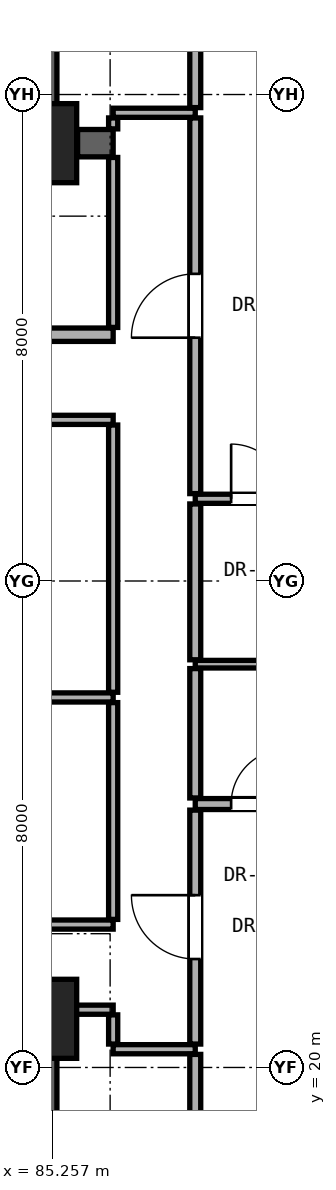
"""IFC4 building model, lengths in metres.
Left out: names, types, materials, properties, quantities, classifications, styles, units other than length and angle.
Written with IfcOpenShell. Run it as: python <this file> out.ifc"""

import sys

from ifc_helpers import new_model, si_unit, direction, frame, frame_2d, origin, origin_2d, place, context, subcontext, project, spatial, rectangle, extrude, element, fill, save


model = new_model("IFC4")
c1 = context("Model", 3, precision=1e-05, world=origin(), true_north=direction((0.0, 1.0)))
c2 = subcontext(c1, "Body", "Model", "MODEL_VIEW")
j1 = project(units=[si_unit("LENGTHUNIT", "METRE"), si_unit("PLANEANGLEUNIT", "RADIAN")], contexts=[c1])
p1 = place(None, origin())
s1 = spatial("IfcSite", under=j1, at=p1, CompositionType="ELEMENT")
p2 = place(p1, origin())
s2 = spatial("IfcBuilding", under=s1, at=p2, CompositionType="ELEMENT")
p3 = place(p2, frame((0.0, 0.0, 65.3)))
s3 = spatial("IfcBuildingStorey", under=s2, at=p3, CompositionType="ELEMENT", Elevation=65.3)
for number, where, z_axis, x_axis in (
    (1, (85.0, 20.8, 0.0), (0.0, 0.0, 1.0), (1.0, 0.0, 0.0)),
    (2, (85.0, 35.2, 0.0), (0.0, 0.0, 1.0), (1.0, 0.0, 0.0)),
):
    element("IfcColumn", number, at=place(p3, frame(where, z_axis=z_axis, x_axis=x_axis)), inside=s3, PredefinedType="COLUMN", context=c2, shape_type="SweptSolid", body=[
        extrude(rectangle(XDim=1.3, YDim=1.3, at=origin_2d()), origin(), (0.0, 0.0, 1.0), 3.3),
    ])
for number, where, z_axis, x_axis in (
    (3, (85.0, 35.2, 0.0), (0.0, 0.0, 1.0), (0.0, 1.0, 0.0)),
    (4, (85.0, 15.2, 0.0), (0.0, 0.0, 1.0), (0.0, 1.0, 0.0)),
):
    element("IfcWall", number, at=place(p3, frame(where, z_axis=z_axis, x_axis=x_axis)), inside=s3, PredefinedType="SHEAR", context=c2, shape_type="SweptSolid", body=[
        extrude(rectangle(XDim=5.6, YDim=0.65, at=frame_2d((2.8, 0.0))), origin(), (0.0, 0.0, 1.0), 3.06),
    ])
p4 = place(p3, frame((86.25, 20.3, 0.0), z_axis=(0.0, 0.0, 1.0), x_axis=(1.0, 0.0, 0.0)))
e5 = element("IfcWall", 5, at=p4, inside=s3, PredefinedType="PARTITIONING", context=c2, shape_type="SweptSolid", body=[
    extrude(rectangle(XDim=1.35, YDim=0.15, at=frame_2d((0.675, 0.0))), origin(), (0.0, 0.0, 1.0), 3.06),
])
p5 = place(p3, frame((85.32, 20.95, 0.0), z_axis=(0.0, 0.0, 1.0), x_axis=(1.0, 0.0, 0.0)))
e6 = element("IfcWall", 6, at=p5, inside=s3, PredefinedType="PARTITIONING", context=c2, shape_type="SweptSolid", body=[
    extrude(rectangle(XDim=0.93, YDim=0.15, at=frame_2d((0.465, 0.0))), origin(), (0.0, 0.0, 1.0), 2.452),
])
p6 = place(p3, frame((66.62, 22.35, 0.0), z_axis=(0.0, 0.0, 1.0), x_axis=(1.0, 0.0, 0.0)))
e7 = element("IfcWall", 7, at=p6, inside=s3, PredefinedType="PARTITIONING", context=c2, shape_type="SweptSolid", body=[
    extrude(rectangle(XDim=19.63, YDim=0.15, at=frame_2d((9.815, 0.0))), origin(), (0.0, 0.0, 1.0), 2.125),
])
p7 = place(p6, frame((8.981, 0.0, 0.0)))
e8 = element("IfcOpeningElement", 8, at=p7, cuts=e7, PredefinedType="OPENING", context=c2, shape_type="SweptSolid", body=[
    extrude(rectangle(XDim=0.85, YDim=2.01, at=frame_2d((0.425, 1.005))), frame((0.0, 0.085, 0.0), z_axis=(0.0, -1.0, 0.0), x_axis=(1.0, 0.0, 0.0)), (0.0, 0.0, 1.0), 0.17),
])
p8 = place(p6, frame((16.061, 0.0, 0.0)))
e9 = element("IfcOpeningElement", 9, at=p8, cuts=e7, PredefinedType="OPENING", context=c2, shape_type="SweptSolid", body=[
    extrude(rectangle(XDim=0.85, YDim=2.01, at=frame_2d((0.425, 1.005))), frame((0.0, 0.085, 0.0), z_axis=(0.0, -1.0, 0.0), x_axis=(1.0, 0.0, 0.0)), (0.0, 0.0, 1.0), 0.17),
])
p9 = place(p3, frame((87.6, 24.332, 0.0), z_axis=(0.0, 0.0, 1.0), x_axis=(1.0, 0.0, 0.0)))
e10 = element("IfcWall", 10, at=p9, inside=s3, PredefinedType="PARTITIONING", context=c2, shape_type="SweptSolid", body=[
    extrude(rectangle(XDim=7.292, YDim=0.18, at=frame_2d((3.646, 0.0))), origin(), (0.0, 0.0, 1.0), 2.196),
])
p10 = place(p9, frame((4.171, 0.0, 0.0)))
e11 = element("IfcOpeningElement", 11, at=p10, cuts=e10, PredefinedType="OPENING", context=c2, shape_type="SweptSolid", body=[
    extrude(rectangle(XDim=0.95, YDim=2.15, at=frame_2d((0.475, 1.075))), frame((0.0, 0.1, 0.0), z_axis=(0.0, -1.0, 0.0), x_axis=(1.0, 0.0, 0.0)), (0.0, 0.0, 1.0), 0.2),
])
p11 = place(p9, frame((0.59, 0.0, 0.0)))
e12 = element("IfcOpeningElement", 12, at=p11, cuts=e10, PredefinedType="OPENING", context=c2, shape_type="SweptSolid", body=[
    extrude(rectangle(XDim=0.9, YDim=2.1, at=frame_2d((0.45, 1.05))), frame((0.0, 0.1, 0.0), z_axis=(0.0, -1.0, 0.0), x_axis=(1.0, 0.0, 0.0)), (0.0, 0.0, 1.0), 0.2),
])
p12 = place(p3, frame((72.05, 26.085, 0.0), z_axis=(0.0, 0.0, 1.0), x_axis=(1.0, 0.0, 0.0)))
e13 = element("IfcWall", 13, at=p12, inside=s3, PredefinedType="PARTITIONING", context=c2, shape_type="SweptSolid", body=[
    extrude(rectangle(XDim=14.2, YDim=0.15, at=frame_2d((7.1, 0.0))), origin(), (0.0, 0.0, 1.0), 2.125),
])
p13 = place(p3, frame((87.6, 26.632, 0.0), z_axis=(0.0, 0.0, 1.0), x_axis=(1.0, 0.0, 0.0)))
e14 = element("IfcWall", 14, at=p13, inside=s3, PredefinedType="PARTITIONING", context=c2, shape_type="SweptSolid", body=[
    extrude(rectangle(XDim=7.292, YDim=0.125, at=frame_2d((3.646, 0.0))), origin(), (0.0, 0.0, 1.0), 2.196),
])
p14 = place(p3, frame((87.6, 29.352, 0.0), z_axis=(0.0, 0.0, 1.0), x_axis=(1.0, 0.0, 0.0)))
e15 = element("IfcWall", 15, at=p14, inside=s3, PredefinedType="PARTITIONING", context=c2, shape_type="SweptSolid", body=[
    extrude(rectangle(XDim=7.292, YDim=0.15, at=frame_2d((3.646, 0.0))), origin(), (0.0, 0.0, 1.0), 2.196),
])
p15 = place(p14, frame((4.171, 0.0, 0.0)))
e16 = element("IfcOpeningElement", 16, at=p15, cuts=e15, PredefinedType="OPENING", context=c2, shape_type="SweptSolid", body=[
    extrude(rectangle(XDim=0.95, YDim=2.15, at=frame_2d((0.475, 1.075))), frame((0.0, 0.085, 0.0), z_axis=(0.0, -1.0, 0.0), x_axis=(1.0, 0.0, 0.0)), (0.0, 0.0, 1.0), 0.17),
])
p16 = place(p14, frame((0.59, 0.0, 0.0)))
e17 = element("IfcOpeningElement", 17, at=p16, cuts=e15, PredefinedType="OPENING", context=c2, shape_type="SweptSolid", body=[
    extrude(rectangle(XDim=0.9, YDim=2.1, at=frame_2d((0.45, 1.05))), frame((0.0, 0.085, 0.0), z_axis=(0.0, -1.0, 0.0), x_axis=(1.0, 0.0, 0.0)), (0.0, 0.0, 1.0), 0.17),
])
p17 = place(p3, frame((66.62, 30.65, 0.0), z_axis=(0.0, 0.0, 1.0), x_axis=(1.0, 0.0, 0.0)))
e18 = element("IfcWall", 18, at=p17, inside=s3, PredefinedType="PARTITIONING", context=c2, shape_type="SweptSolid", body=[
    extrude(rectangle(XDim=19.63, YDim=0.15, at=frame_2d((9.815, 0.0))), origin(), (0.0, 0.0, 1.0), 2.125),
])
p18 = place(p17, frame((3.855, 0.0, 0.0)))
e19 = element("IfcOpeningElement", 19, at=p18, cuts=e18, PredefinedType="OPENING", context=c2, shape_type="SweptSolid", body=[
    extrude(rectangle(XDim=0.85, YDim=2.01, at=frame_2d((0.425, 1.005))), frame((0.0, 0.085, 0.0), z_axis=(0.0, -1.0, 0.0), x_axis=(1.0, 0.0, 0.0)), (0.0, 0.0, 1.0), 0.17),
])
p19 = place(p17, frame((8.981, 0.0, 0.0)))
e20 = element("IfcOpeningElement", 20, at=p19, cuts=e18, PredefinedType="OPENING", context=c2, shape_type="SweptSolid", body=[
    extrude(rectangle(XDim=0.85, YDim=2.01, at=frame_2d((0.425, 1.005))), frame((0.0, 0.085, 0.0), z_axis=(0.0, -1.0, 0.0), x_axis=(1.0, 0.0, 0.0)), (0.0, 0.0, 1.0), 0.17),
])
p20 = place(p17, frame((16.061, 0.0, 0.0)))
e21 = element("IfcOpeningElement", 21, at=p20, cuts=e18, PredefinedType="OPENING", context=c2, shape_type="SweptSolid", body=[
    extrude(rectangle(XDim=0.85, YDim=2.01, at=frame_2d((0.425, 1.005))), frame((0.0, 0.085, 0.0), z_axis=(0.0, -1.0, 0.0), x_axis=(1.0, 0.0, 0.0)), (0.0, 0.0, 1.0), 0.17),
])
p21 = place(p3, frame((71.55, 32.05, 0.0), z_axis=(0.0, 0.0, 1.0), x_axis=(1.0, 0.0, 0.0)))
e22 = element("IfcWall", 22, at=p21, inside=s3, PredefinedType="SOLIDWALL", context=c2, shape_type="SweptSolid", body=[
    extrude(rectangle(XDim=14.7, YDim=0.22, at=frame_2d((7.35, 0.0))), origin(), (0.0, 0.0, 1.0), 2.125),
])
p22 = place(p21, frame((11.39, 0.0, 0.0)))
e23 = element("IfcOpeningElement", 23, at=p22, cuts=e22, PredefinedType="OPENING", context=c2, shape_type="SweptSolid", body=[
    extrude(rectangle(XDim=0.85, YDim=2.01, at=frame_2d((0.425, 1.005))), frame((0.0, 0.12, 0.0), z_axis=(0.0, -1.0, 0.0), x_axis=(1.0, 0.0, 0.0)), (0.0, 0.0, 1.0), 0.24),
])
p23 = place(p21, frame((6.065, 0.0, 0.0)))
e24 = element("IfcOpeningElement", 24, at=p23, cuts=e22, PredefinedType="OPENING", context=c2, shape_type="SweptSolid", body=[
    extrude(rectangle(XDim=0.85, YDim=2.01, at=frame_2d((0.425, 1.005))), frame((0.0, 0.12, 0.0), z_axis=(0.0, -1.0, 0.0), x_axis=(1.0, 0.0, 0.0)), (0.0, 0.0, 1.0), 0.24),
])
p24 = place(p21, frame((0.7, 0.0, 0.0)))
e25 = element("IfcOpeningElement", 25, at=p24, cuts=e22, PredefinedType="OPENING", context=c2, shape_type="SweptSolid", body=[
    extrude(rectangle(XDim=0.85, YDim=2.01, at=frame_2d((0.425, 1.005))), frame((0.0, 0.12, 0.0), z_axis=(0.0, -1.0, 0.0), x_axis=(1.0, 0.0, 0.0)), (0.0, 0.0, 1.0), 0.24),
])
p25 = place(p21, frame((2.55, 0.0, 0.0)))
e26 = element("IfcOpeningElement", 26, at=p25, cuts=e22, PredefinedType="OPENING", context=c2, shape_type="SweptSolid", body=[
    extrude(rectangle(XDim=0.85, YDim=2.01, at=frame_2d((0.425, 1.005))), frame((0.0, 0.12, 0.0), z_axis=(0.0, -1.0, 0.0), x_axis=(1.0, 0.0, 0.0)), (0.0, 0.0, 1.0), 0.24),
])
p26 = place(p3, frame((85.665, 35.2, 0.0), z_axis=(0.0, 0.0, 1.0), x_axis=(1.0, 0.0, 0.0)))
e27 = element("IfcWall", 27, at=p26, inside=s3, PredefinedType="SHEAR", context=c2, shape_type="SweptSolid", body=[
    extrude(rectangle(XDim=0.585, YDim=0.45, at=frame_2d((0.292, 0.0))), origin(), (0.0, 0.0, 1.0), 3.06),
])
p27 = place(p3, frame((86.25, 35.7, 0.0), z_axis=(0.0, 0.0, 1.0), x_axis=(1.0, 0.0, 0.0)))
e28 = element("IfcWall", 28, at=p27, inside=s3, PredefinedType="PARTITIONING", context=c2, shape_type="SweptSolid", body=[
    extrude(rectangle(XDim=1.35, YDim=0.15, at=frame_2d((0.675, 0.0))), origin(), (0.0, 0.0, 1.0), 3.06),
])
p28 = place(p3, frame((86.25, 20.385, 0.0), z_axis=(0.0, 0.0, 1.0), x_axis=(0.0, 1.0, 0.0)))
e29 = element("IfcWall", 29, at=p28, inside=s3, PredefinedType="PARTITIONING", context=c2, shape_type="SweptSolid", body=[
    extrude(rectangle(XDim=0.48, YDim=0.15, at=frame_2d((0.24, 0.0))), origin(), (0.0, 0.0, 1.0), 2.452),
])
p29 = place(p3, frame((86.25, 22.435, 0.0), z_axis=(0.0, 0.0, 1.0), x_axis=(0.0, 1.0, 0.0)))
e30 = element("IfcWall", 30, at=p29, inside=s3, PredefinedType="PARTITIONING", context=c2, shape_type="SweptSolid", body=[
    extrude(rectangle(XDim=3.565, YDim=0.15, at=frame_2d((1.782, 0.0))), origin(), (0.0, 0.0, 1.0), 3.06),
])
p30 = place(p3, frame((86.25, 26.17, 0.0), z_axis=(0.0, 0.0, 1.0), x_axis=(0.0, 1.0, 0.0)))
e31 = element("IfcWall", 31, at=p30, inside=s3, PredefinedType="PARTITIONING", context=c2, shape_type="SweptSolid", body=[
    extrude(rectangle(XDim=4.395, YDim=0.15, at=frame_2d((2.198, 0.0))), origin(), (0.0, 0.0, 1.0), 2.279),
])
p31 = place(p3, frame((86.25, 32.17, 0.0), z_axis=(0.0, 0.0, 1.0), x_axis=(0.0, 1.0, 0.0)))
e32 = element("IfcWall", 32, at=p31, inside=s3, PredefinedType="PARTITIONING", context=c2, shape_type="SweptSolid", body=[
    extrude(rectangle(XDim=2.795, YDim=0.15, at=frame_2d((1.397, 0.0))), origin(), (0.0, 0.0, 1.0), 2.452),
])
p32 = place(p3, frame((86.25, 35.435, 0.0), z_axis=(0.0, 0.0, 1.0), x_axis=(0.0, 1.0, 0.0)))
e33 = element("IfcWall", 33, at=p32, inside=s3, PredefinedType="PARTITIONING", context=c2, shape_type="SweptSolid", body=[
    extrude(rectangle(XDim=0.18, YDim=0.15, at=frame_2d((0.09, 0.0))), origin(), (0.0, 0.0, 1.0), 2.452),
])
p33 = place(p3, frame((87.6, 16.537, 0.0), z_axis=(0.0, 0.0, 1.0), x_axis=(0.0, 1.0, 0.0)))
e34 = element("IfcWall", 34, at=p33, inside=s3, PredefinedType="PARTITIONING", context=c2, shape_type="SweptSolid", body=[
    extrude(rectangle(XDim=3.678, YDim=0.18, at=frame_2d((1.839, 0.0))), origin(), (0.0, 0.0, 1.0), 2.436),
])
p34 = place(p3, frame((87.6, 20.385, 0.0), z_axis=(0.0, 0.0, 1.0), x_axis=(0.0, 1.0, 0.0)))
e35 = element("IfcWall", 35, at=p34, inside=s3, PredefinedType="PARTITIONING", context=c2, shape_type="SweptSolid", body=[
    extrude(rectangle(XDim=3.847, YDim=0.18, at=frame_2d((1.923, 0.0))), origin(), (0.0, 0.0, 1.0), 2.452),
])
p35 = place(p34, frame((1.398, 0.0, 0.0)))
e36 = element("IfcOpeningElement", 36, at=p35, cuts=e35, PredefinedType="OPENING", context=c2, shape_type="SweptSolid", body=[
    extrude(rectangle(XDim=1.05, YDim=2.2, at=frame_2d((0.525, 1.1))), frame((0.0, 0.1, 0.0), z_axis=(0.0, -1.0, 0.0), x_axis=(1.0, 0.0, 0.0)), (0.0, 0.0, 1.0), 0.2),
])
p36 = place(p3, frame((87.6, 24.432, 0.0), z_axis=(0.0, 0.0, 1.0), x_axis=(0.0, 1.0, 0.0)))
e37 = element("IfcWall", 37, at=p36, inside=s3, PredefinedType="PARTITIONING", context=c2, shape_type="SweptSolid", body=[
    extrude(rectangle(XDim=2.128, YDim=0.18, at=frame_2d((1.064, 0.0))), origin(), (0.0, 0.0, 1.0), 3.06),
])
p37 = place(p3, frame((87.6, 26.705, 0.0), z_axis=(0.0, 0.0, 1.0), x_axis=(0.0, 1.0, 0.0)))
e38 = element("IfcWall", 38, at=p37, inside=s3, PredefinedType="PARTITIONING", context=c2, shape_type="SweptSolid", body=[
    extrude(rectangle(XDim=2.562, YDim=0.18, at=frame_2d((1.281, 0.0))), origin(), (0.0, 0.0, 1.0), 2.279),
])
p38 = place(p3, frame((87.6, 29.437, 0.0), z_axis=(0.0, 0.0, 1.0), x_axis=(0.0, 1.0, 0.0)))
e39 = element("IfcWall", 39, at=p38, inside=s3, PredefinedType="PARTITIONING", context=c2, shape_type="SweptSolid", body=[
    extrude(rectangle(XDim=6.178, YDim=0.18, at=frame_2d((3.089, 0.0))), origin(), (0.0, 0.0, 1.0), 2.452),
])
p39 = place(p38, frame((2.564, 0.0, 0.0)))
e40 = element("IfcOpeningElement", 40, at=p39, cuts=e39, PredefinedType="OPENING", context=c2, shape_type="SweptSolid", body=[
    extrude(rectangle(XDim=1.05, YDim=2.2, at=frame_2d((0.525, 1.1))), frame((0.0, 0.1, 0.0), z_axis=(0.0, -1.0, 0.0), x_axis=(1.0, 0.0, 0.0)), (0.0, 0.0, 1.0), 0.2),
])
p40 = place(p3, frame((87.6, 35.785, 0.0), z_axis=(0.0, 0.0, 1.0), x_axis=(0.0, 1.0, 0.0)))
e41 = element("IfcWall", 41, at=p40, inside=s3, PredefinedType="PARTITIONING", context=c2, shape_type="SweptSolid", body=[
    extrude(rectangle(XDim=3.693, YDim=0.18, at=frame_2d((1.847, 0.0))), origin(), (0.0, 0.0, 1.0), 2.436),
])
p41 = place(p35, origin())
e42 = element("IfcDoor", 42, at=p41, inside=s3, OperationType="SINGLE_SWING_RIGHT", PredefinedType="DOOR", context=c2, shape_type="SweptSolid", body=[
    extrude(rectangle(XDim=1.05, YDim=2.2, at=frame_2d((0.525, 1.1))), frame((0.0, 0.025, 0.0), z_axis=(0.0, -1.0, 0.0), x_axis=(1.0, 0.0, 0.0)), (0.0, 0.0, 1.0), 0.05),
])
fill(e36, e42)
p42 = place(p11, origin())
e43 = element("IfcDoor", 43, at=p42, inside=s3, OperationType="SINGLE_SWING_RIGHT", PredefinedType="DOOR", context=c2, shape_type="SweptSolid", body=[
    extrude(rectangle(XDim=0.9, YDim=2.1, at=frame_2d((0.45, 1.05))), frame((0.0, 0.025, 0.0), z_axis=(0.0, -1.0, 0.0), x_axis=(1.0, 0.0, 0.0)), (0.0, 0.0, 1.0), 0.05),
])
fill(e12, e43)
p43 = place(p39, origin())
e44 = element("IfcDoor", 44, at=p43, inside=s3, OperationType="SINGLE_SWING_LEFT", PredefinedType="DOOR", context=c2, shape_type="SweptSolid", body=[
    extrude(rectangle(XDim=1.05, YDim=2.2, at=frame_2d((0.525, 1.1))), frame((0.0, 0.025, 0.0), z_axis=(0.0, -1.0, 0.0), x_axis=(1.0, 0.0, 0.0)), (0.0, 0.0, 1.0), 0.05),
])
fill(e40, e44)
p44 = place(p16, origin())
e45 = element("IfcDoor", 45, at=p44, inside=s3, OperationType="SINGLE_SWING_LEFT", PredefinedType="DOOR", context=c2, shape_type="SweptSolid", body=[
    extrude(rectangle(XDim=0.9, YDim=2.1, at=frame_2d((0.45, 1.05))), frame((0.0, 0.025, 0.0), z_axis=(0.0, -1.0, 0.0), x_axis=(1.0, 0.0, 0.0)), (0.0, 0.0, 1.0), 0.05),
])
fill(e17, e45)
save(model, sys.argv[1])
